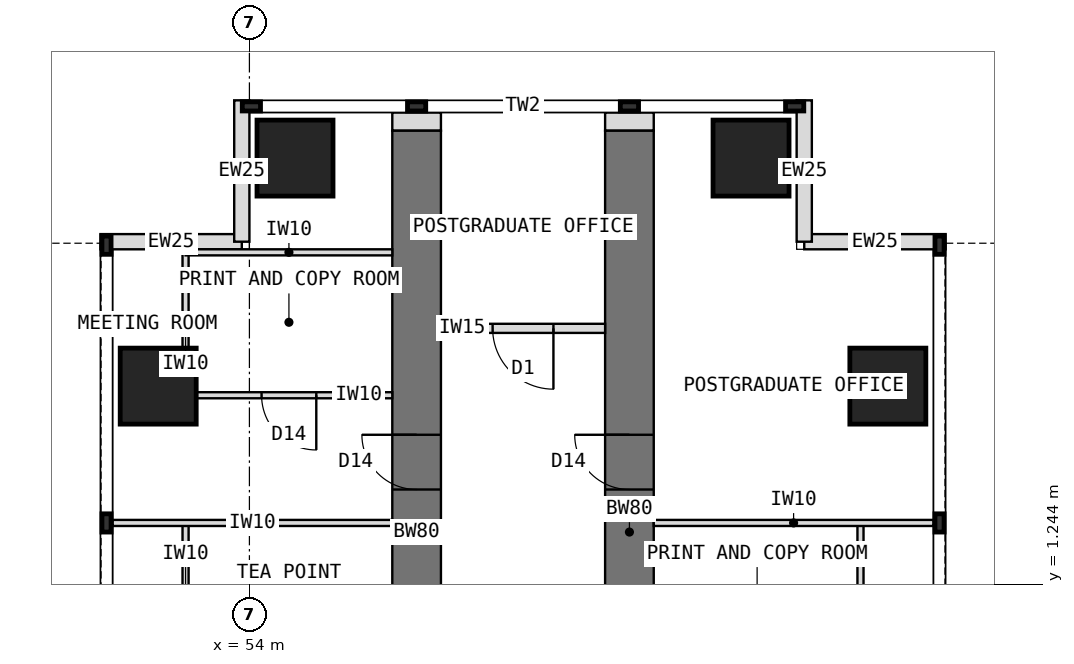
"""IFC4 building model, lengths in metres.
Left out: names, types, materials, properties, quantities, classifications, styles, units other than length and angle.
Written with IfcOpenShell. Run it as: python <this file> out.ifc"""

import sys

from ifc_helpers import new_model, si_unit, direction, frame, frame_2d, origin, origin_2d, place, context, subcontext, project, spatial, rectangle, extrude, element, fill, save


model = new_model("IFC4")
c1 = context("Model", 3, precision=1e-05, world=origin(), true_north=direction((0.0, 1.0)))
c2 = subcontext(c1, "Body", "Model", "MODEL_VIEW")
j1 = project(units=[si_unit("LENGTHUNIT", "METRE"), si_unit("PLANEANGLEUNIT", "RADIAN")], contexts=[c1])
p1 = place(None, origin())
s1 = spatial("IfcSite", under=j1, at=p1, CompositionType="ELEMENT")
p2 = place(p1, origin())
s2 = spatial("IfcBuilding", under=s1, at=p2, CompositionType="ELEMENT")
p3 = place(p2, frame((0.0, 0.0, 157.5)))
s3 = spatial("IfcBuildingStorey", under=s2, at=p3, CompositionType="ELEMENT", Elevation=157.5)
p4 = place(p3, frame((56.75, -4.5, 0.0), z_axis=(0.0, 0.0, 1.0), x_axis=(0.0, 1.0, 0.0)))
e1 = element("IfcWall", 1, at=p4, inside=s3, PredefinedType="SHEAR", context=c2, shape_type="SweptSolid", body=[
    extrude(rectangle(XDim=13.2, YDim=0.8, at=frame_2d((6.6, 0.0))), origin(), (0.0, 0.0, 1.0), 4.0),
])
p5 = place(p4, frame((0.55, 0.0, 0.0)))
e2 = element("IfcOpeningElement", 2, at=p5, cuts=e1, PredefinedType="OPENING", context=c2, shape_type="SweptSolid", body=[
    extrude(rectangle(XDim=0.9, YDim=2.1, at=frame_2d((0.45, 1.05))), frame((0.0, 0.41, 0.0), z_axis=(0.0, -1.0, 0.0), x_axis=(1.0, 0.0, 0.0)), (0.0, 0.0, 1.0), 0.82),
])
p6 = place(p4, frame((2.8, 0.0, 0.0)))
e3 = element("IfcOpeningElement", 3, at=p6, cuts=e1, PredefinedType="OPENING", context=c2, shape_type="SweptSolid", body=[
    extrude(rectangle(XDim=0.9, YDim=2.1, at=frame_2d((0.45, 1.05))), frame((0.0, 0.41, 0.0), z_axis=(0.0, -1.0, 0.0), x_axis=(1.0, 0.0, 0.0)), (0.0, 0.0, 1.0), 0.82),
])
p7 = place(p4, frame((7.3, 0.0, 0.0)))
e4 = element("IfcOpeningElement", 4, at=p7, cuts=e1, PredefinedType="OPENING", context=c2, shape_type="SweptSolid", body=[
    extrude(rectangle(XDim=0.9, YDim=2.1, at=frame_2d((0.45, 1.05))), frame((0.0, 0.41, 0.0), z_axis=(0.0, -1.0, 0.0), x_axis=(1.0, 0.0, 0.0)), (0.0, 0.0, 1.0), 0.82),
])
p8 = place(p3, frame((60.25, -4.5, 0.0), z_axis=(0.0, 0.0, 1.0), x_axis=(0.0, 1.0, 0.0)))
e5 = element("IfcWall", 5, at=p8, inside=s3, PredefinedType="SHEAR", context=c2, shape_type="SweptSolid", body=[
    extrude(rectangle(XDim=13.2, YDim=0.8, at=frame_2d((6.6, 0.0))), origin(), (0.0, 0.0, 1.0), 4.0),
])
p9 = place(p8, frame((0.55, 0.0, 0.0)))
e6 = element("IfcOpeningElement", 6, at=p9, cuts=e5, PredefinedType="OPENING", context=c2, shape_type="SweptSolid", body=[
    extrude(rectangle(XDim=0.9, YDim=2.1, at=frame_2d((0.45, 1.05))), frame((0.0, 0.41, 0.0), z_axis=(0.0, -1.0, 0.0), x_axis=(1.0, 0.0, 0.0)), (0.0, 0.0, 1.0), 0.82),
])
p10 = place(p8, frame((2.8, 0.0, 0.0)))
e7 = element("IfcOpeningElement", 7, at=p10, cuts=e5, PredefinedType="OPENING", context=c2, shape_type="SweptSolid", body=[
    extrude(rectangle(XDim=0.9, YDim=2.1, at=frame_2d((0.45, 1.05))), frame((0.0, 0.41, 0.0), z_axis=(0.0, -1.0, 0.0), x_axis=(1.0, 0.0, 0.0)), (0.0, 0.0, 1.0), 0.82),
])
p11 = place(p8, frame((7.3, 0.0, 0.0)))
e8 = element("IfcOpeningElement", 8, at=p11, cuts=e5, PredefinedType="OPENING", context=c2, shape_type="SweptSolid", body=[
    extrude(rectangle(XDim=0.9, YDim=2.1, at=frame_2d((0.45, 1.05))), frame((0.0, 0.41, 0.0), z_axis=(0.0, -1.0, 0.0), x_axis=(1.0, 0.0, 0.0)), (0.0, 0.0, 1.0), 0.82),
])
for number, where, z_axis, x_axis in (
    (9, (52.5, 4.5, 0.0), (0.0, 0.0, 1.0), (1.0, 0.0, 0.0)),
    (10, (64.5, 4.5, 0.0), (0.0, 0.0, 1.0), (1.0, 0.0, 0.0)),
    (11, (54.75, 8.25, 0.0), (0.0, 0.0, 1.0), (1.0, 0.0, 0.0)),
    (12, (62.25, 8.25, 0.0), (0.0, 0.0, 1.0), (1.0, 0.0, 0.0)),
):
    element("IfcColumn", number, at=place(p3, frame(where, z_axis=z_axis, x_axis=x_axis)), inside=s3, PredefinedType="COLUMN", context=c2, shape_type="SweptSolid", body=[
        extrude(rectangle(XDim=1.25, YDim=1.25, at=origin_2d()), origin(), (0.0, 0.0, 1.0), 4.0),
    ])
for number, where, z_axis, x_axis in (
    (13, (51.55, 6.875, 0.0), (0.0, 0.0, 1.0), (1.0, 0.0, 0.0)),
    (14, (53.875, 6.875, 0.0), (0.0, 0.0, 1.0), (0.0, 1.0, 0.0)),
    (15, (65.45, 6.875, 0.0), (0.0, 0.0, 1.0), (-1.0, 0.0, 0.0)),
    (16, (63.125, 6.875, 0.0), (0.0, 0.0, 1.0), (0.0, 1.0, 0.0)),
):
    element("IfcWall", number, at=place(p3, frame(where, z_axis=z_axis, x_axis=x_axis)), inside=s3, PredefinedType="STANDARD", context=c2, shape_type="SweptSolid", body=[
        extrude(rectangle(XDim=2.325, YDim=0.25, at=frame_2d((1.163, 0.0))), origin(), (0.0, 0.0, 1.0), 3.8),
    ])
for number, where, z_axis, x_axis in (
    (17, (56.75, 8.7, 0.0), (0.0, 0.0, 1.0), (0.0, 1.0, 0.0)),
    (18, (60.25, 8.7, 0.0), (0.0, 0.0, 1.0), (0.0, 1.0, 0.0)),
):
    element("IfcWall", number, at=place(p3, frame(where, z_axis=z_axis, x_axis=x_axis)), inside=s3, PredefinedType="PARTITIONING", context=c2, shape_type="SweptSolid", body=[
        extrude(rectangle(XDim=0.3, YDim=0.8, at=frame_2d((0.15, 0.0))), origin(), (0.0, 0.0, 1.0), 3.8),
    ])
p12 = place(p3, frame((56.35, 2.25, 0.0), z_axis=(0.0, 0.0, 1.0), x_axis=(-1.0, 0.0, 0.0)))
e19 = element("IfcWall", 19, at=p12, inside=s3, PredefinedType="PARTITIONING", context=c2, shape_type="SweptSolid", body=[
    extrude(rectangle(XDim=4.6, YDim=0.1, at=frame_2d((2.3, 0.0))), origin(), (0.0, 0.0, 1.0), 3.8),
])
for number, where, z_axis, x_axis in (
    (20, (52.95, -0.15, 0.0), (0.0, 0.0, 1.0), (0.0, 1.0, 0.0)),
    (21, (52.95, 4.35, 0.0), (0.0, 0.0, 1.0), (0.0, 1.0, 0.0)),
):
    element("IfcWall", number, at=place(p3, frame(where, z_axis=z_axis, x_axis=x_axis)), inside=s3, PredefinedType="PARTITIONING", context=c2, shape_type="SweptSolid", body=[
        extrude(rectangle(XDim=2.4, YDim=0.1, at=frame_2d((1.2, 0.0))), origin(), (0.0, 0.0, 1.0), 3.8),
    ])
p13 = place(p3, frame((56.35, 4.35, 0.0), z_axis=(0.0, 0.0, 1.0), x_axis=(-1.0, 0.0, 0.0)))
e22 = element("IfcWall", 22, at=p13, inside=s3, PredefinedType="PARTITIONING", context=c2, shape_type="SweptSolid", body=[
    extrude(rectangle(XDim=3.4, YDim=0.1, at=frame_2d((1.7, 0.0))), origin(), (0.0, 0.0, 1.0), 3.8),
])
p14 = place(p13, frame((1.25, 0.0, 0.0)))
e23 = element("IfcOpeningElement", 23, at=p14, cuts=e22, PredefinedType="OPENING", context=c2, shape_type="SweptSolid", body=[
    extrude(rectangle(XDim=0.9, YDim=2.1, at=frame_2d((0.45, 1.05))), frame((0.0, 0.06, 0.0), z_axis=(0.0, -1.0, 0.0), x_axis=(1.0, 0.0, 0.0)), (0.0, 0.0, 1.0), 0.12),
])
p15 = place(p3, frame((56.35, 6.7, 0.0), z_axis=(0.0, 0.0, 1.0), x_axis=(-1.0, 0.0, 0.0)))
e24 = element("IfcWall", 24, at=p15, inside=s3, PredefinedType="PARTITIONING", context=c2, shape_type="SweptSolid", body=[
    extrude(rectangle(XDim=3.4, YDim=0.1, at=frame_2d((1.7, 0.0))), origin(), (0.0, 0.0, 1.0), 3.8),
])
p16 = place(p3, frame((60.65, 2.25, 0.0), z_axis=(0.0, 0.0, 1.0), x_axis=(1.0, 0.0, 0.0)))
e25 = element("IfcWall", 25, at=p16, inside=s3, PredefinedType="PARTITIONING", context=c2, shape_type="SweptSolid", body=[
    extrude(rectangle(XDim=4.6, YDim=0.1, at=frame_2d((2.3, 0.0))), origin(), (0.0, 0.0, 1.0), 3.8),
])
p17 = place(p3, frame((64.05, -0.15, 0.0), z_axis=(0.0, 0.0, 1.0), x_axis=(0.0, 1.0, 0.0)))
e26 = element("IfcWall", 26, at=p17, inside=s3, PredefinedType="PARTITIONING", context=c2, shape_type="SweptSolid", body=[
    extrude(rectangle(XDim=2.4, YDim=0.1, at=frame_2d((1.2, 0.0))), origin(), (0.0, 0.0, 1.0), 3.8),
])
p18 = place(p3, frame((59.85, 5.45, 0.0), z_axis=(0.0, 0.0, 1.0), x_axis=(-1.0, 0.0, 0.0)))
e27 = element("IfcWall", 27, at=p18, inside=s3, PredefinedType="PARTITIONING", context=c2, shape_type="SweptSolid", body=[
    extrude(rectangle(XDim=2.7, YDim=0.15, at=frame_2d((1.35, 0.0))), origin(), (0.0, 0.0, 1.0), 3.8),
])
p19 = place(p18, frame((0.85, 0.0, 0.0)))
e28 = element("IfcOpeningElement", 28, at=p19, cuts=e27, PredefinedType="OPENING", context=c2, shape_type="SweptSolid", body=[
    extrude(rectangle(XDim=1.0, YDim=2.1, at=frame_2d((0.5, 1.05))), frame((0.0, 0.085, 0.0), z_axis=(0.0, -1.0, 0.0), x_axis=(1.0, 0.0, 0.0)), (0.0, 0.0, 1.0), 0.17),
])
p20 = place(p14, origin())
e29 = element("IfcDoor", 29, at=p20, inside=s3, OperationType="SINGLE_SWING_LEFT", PredefinedType="DOOR", context=c2, shape_type="SweptSolid", body=[
    extrude(rectangle(XDim=0.9, YDim=2.1, at=frame_2d((0.45, 1.05))), frame((0.0, 0.025, 0.0), z_axis=(0.0, -1.0, 0.0), x_axis=(1.0, 0.0, 0.0)), (0.0, 0.0, 1.0), 0.05),
])
fill(e23, e29)
p21 = place(p19, origin())
e30 = element("IfcDoor", 30, at=p21, inside=s3, OperationType="SINGLE_SWING_LEFT", PredefinedType="DOOR", context=c2, shape_type="SweptSolid", body=[
    extrude(rectangle(XDim=1.0, YDim=2.1, at=frame_2d((0.5, 1.05))), frame((0.0, 0.025, 0.0), z_axis=(0.0, -1.0, 0.0), x_axis=(1.0, 0.0, 0.0)), (0.0, 0.0, 1.0), 0.05),
])
fill(e28, e30)
p22 = place(p7, origin())
e31 = element("IfcDoor", 31, at=p22, inside=s3, OperationType="SINGLE_SWING_RIGHT", PredefinedType="DOOR", context=c2, shape_type="SweptSolid", body=[
    extrude(rectangle(XDim=0.82, YDim=2.06, at=frame_2d((0.45, 1.03))), frame((0.0, 0.025, 0.0), z_axis=(0.0, -1.0, 0.0), x_axis=(1.0, 0.0, 0.0)), (0.0, 0.0, 1.0), 0.05),
    extrude(rectangle(XDim=0.04, YDim=2.1, at=frame_2d((0.02, 1.05))), frame((0.0, 0.4, 0.0), z_axis=(0.0, -1.0, 0.0), x_axis=(1.0, 0.0, 0.0)), (0.0, 0.0, 1.0), 0.8),
    extrude(rectangle(XDim=0.04, YDim=2.1, at=frame_2d((0.88, 1.05))), frame((0.0, 0.4, 0.0), z_axis=(0.0, -1.0, 0.0), x_axis=(1.0, 0.0, 0.0)), (0.0, 0.0, 1.0), 0.8),
    extrude(rectangle(XDim=0.82, YDim=0.04, at=frame_2d((0.45, 2.08))), frame((0.0, 0.4, 0.0), z_axis=(0.0, -1.0, 0.0), x_axis=(1.0, 0.0, 0.0)), (0.0, 0.0, 1.0), 0.8),
])
fill(e4, e31)
p23 = place(p11, origin())
e32 = element("IfcDoor", 32, at=p23, inside=s3, OperationType="SINGLE_SWING_RIGHT", PredefinedType="DOOR", context=c2, shape_type="SweptSolid", body=[
    extrude(rectangle(XDim=0.82, YDim=2.06, at=frame_2d((0.45, 1.03))), frame((0.0, 0.025, 0.0), z_axis=(0.0, -1.0, 0.0), x_axis=(1.0, 0.0, 0.0)), (0.0, 0.0, 1.0), 0.05),
    extrude(rectangle(XDim=0.04, YDim=2.1, at=frame_2d((0.02, 1.05))), frame((0.0, 0.4, 0.0), z_axis=(0.0, -1.0, 0.0), x_axis=(1.0, 0.0, 0.0)), (0.0, 0.0, 1.0), 0.8),
    extrude(rectangle(XDim=0.04, YDim=2.1, at=frame_2d((0.88, 1.05))), frame((0.0, 0.4, 0.0), z_axis=(0.0, -1.0, 0.0), x_axis=(1.0, 0.0, 0.0)), (0.0, 0.0, 1.0), 0.8),
    extrude(rectangle(XDim=0.82, YDim=0.04, at=frame_2d((0.45, 2.08))), frame((0.0, 0.4, 0.0), z_axis=(0.0, -1.0, 0.0), x_axis=(1.0, 0.0, 0.0)), (0.0, 0.0, 1.0), 0.8),
])
fill(e8, e32)
save(model, sys.argv[1])
